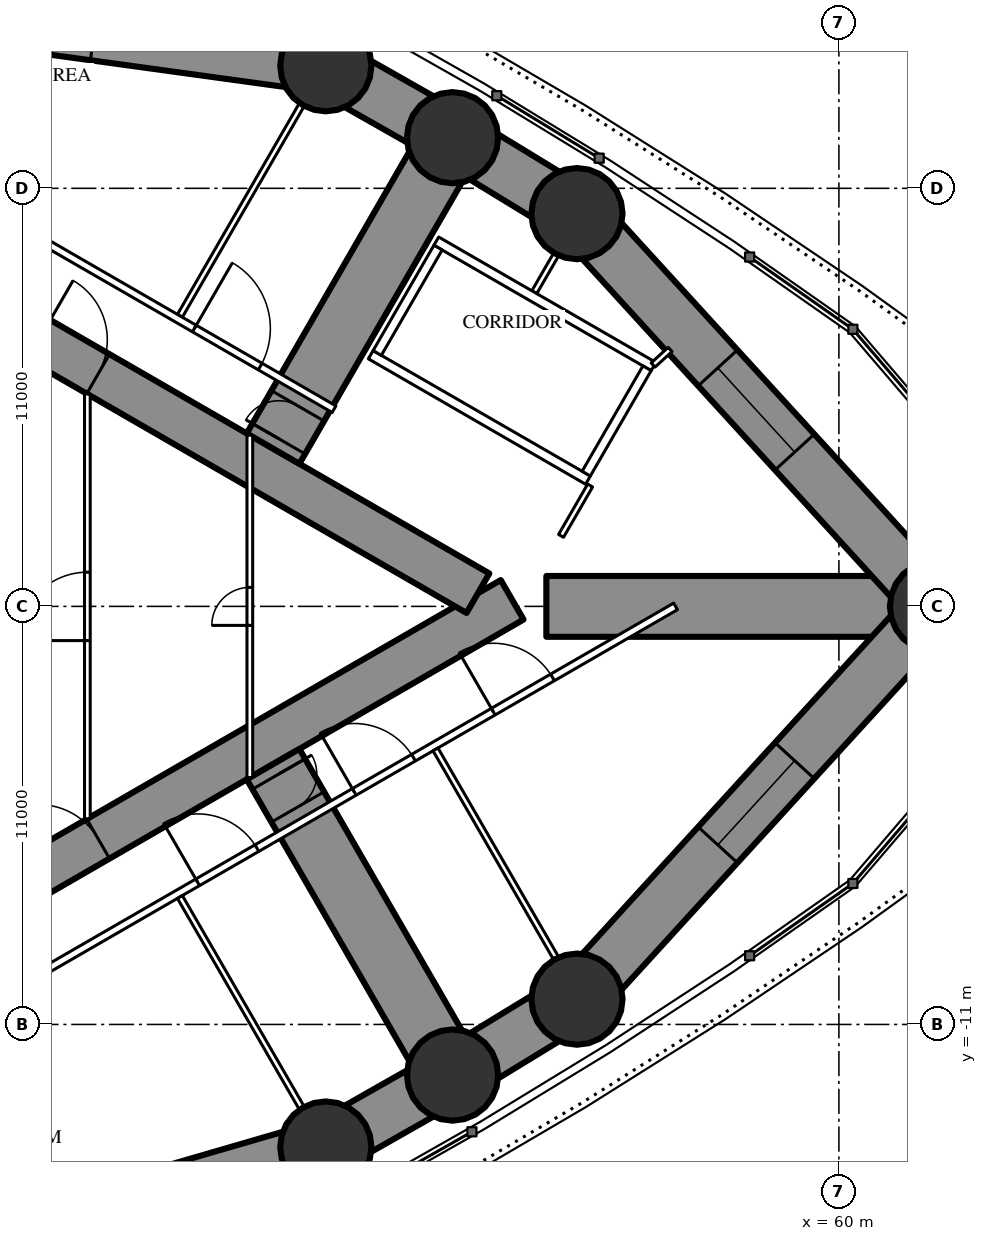
"""IFC4 building model, lengths in metres.
Left out: names, types, materials, properties, quantities, classifications, styles, units other than length and angle.
Written with IfcOpenShell. Run it as: python <this file> out.ifc"""

import sys

from ifc_helpers import new_model, si_unit, direction, frame, frame_2d, origin, origin_2d, place, context, subcontext, project, spatial, rectangle, circle, extrude, element, fill, save


model = new_model("IFC4")
c1 = context("Model", 3, precision=1e-05, world=origin(), true_north=direction((0.0, 1.0)))
c2 = subcontext(c1, "Body", "Model", "MODEL_VIEW")
j1 = project(units=[si_unit("LENGTHUNIT", "METRE"), si_unit("PLANEANGLEUNIT", "RADIAN")], contexts=[c1])
p1 = place(None, origin())
s1 = spatial("IfcSite", under=j1, at=p1, CompositionType="ELEMENT")
p2 = place(p1, origin())
s2 = spatial("IfcBuilding", under=s1, at=p2, CompositionType="ELEMENT")
p3 = place(p2, frame((0.0, 0.0, 210.3)))
s3 = spatial("IfcBuildingStorey", under=s2, at=p3, CompositionType="ELEMENT", Elevation=210.3)
for number, where, z_axis, x_axis in (
    (1, (62.542, 0.0, 0.0), (0.0, 0.0, 1.0), (1.0, 0.0, 0.0)),
    (2, (53.108, 10.334, 0.0), (0.0, 0.0, 1.0), (1.0, 0.0, 0.0)),
    (3, (49.834, 12.332, 0.0), (0.0, 0.0, 1.0), (1.0, 0.0, 0.0)),
    (4, (46.499, 14.226, 0.0), (0.0, 0.0, 1.0), (1.0, 0.0, 0.0)),
    (5, (46.499, -14.226, 0.0), (0.0, 0.0, 1.0), (1.0, 0.0, 0.0)),
    (6, (49.834, -12.332, 0.0), (0.0, 0.0, 1.0), (1.0, 0.0, 0.0)),
    (7, (53.108, -10.334, 0.0), (0.0, 0.0, 1.0), (1.0, 0.0, 0.0)),
):
    element("IfcColumn", number, at=place(p3, frame(where, z_axis=z_axis, x_axis=x_axis)), inside=s3, PredefinedType="COLUMN", context=c2, shape_type="SweptSolid", body=[
        extrude(circle(Radius=1.2, at=origin_2d()), origin(), (0.0, 0.0, 1.0), 5.0),
    ])
p4 = place(p3, frame((27.2, -13.8, 0.0), z_axis=(0.0, 0.0, 1.0), x_axis=(0.866027159892, 0.499996958321, 0.0)))
e8 = element("IfcWall", 8, at=p4, inside=s3, PredefinedType="SHEAR", context=c2, shape_type="SweptSolid", body=[
    extrude(rectangle(XDim=27.947, YDim=1.2, at=frame_2d((13.973, 0.0))), origin(), (0.0, 0.0, 1.0), 5.0),
])
p5 = place(p4, frame((6.5, 0.0, 0.0)))
e9 = element("IfcOpeningElement", 9, at=p5, cuts=e8, PredefinedType="OPENING", context=c2, shape_type="SweptSolid", body=[
    extrude(rectangle(XDim=1.0, YDim=2.2, at=frame_2d((0.5, 1.1))), frame((0.0, 0.61, 0.0), z_axis=(0.0, -1.0, 0.0), x_axis=(1.0, 0.0, 0.0)), (0.0, 0.0, 1.0), 1.22),
])
p6 = place(p4, frame((13.568, 0.0, 0.0)))
e10 = element("IfcOpeningElement", 10, at=p6, cuts=e8, PredefinedType="OPENING", context=c2, shape_type="SweptSolid", body=[
    extrude(rectangle(XDim=1.8, YDim=2.2, at=frame_2d((0.9, 1.1))), frame((0.0, 0.61, 0.0), z_axis=(0.0, -1.0, 0.0), x_axis=(1.0, 0.0, 0.0)), (0.0, 0.0, 1.0), 1.22),
])
p7 = place(p3, frame((27.2, 13.8, 0.0), z_axis=(0.0, 0.0, 1.0), x_axis=(0.866024515034, -0.500001539357, 0.0)))
e11 = element("IfcWall", 11, at=p7, inside=s3, PredefinedType="SHEAR", context=c2, shape_type="SweptSolid", body=[
    extrude(rectangle(XDim=26.907, YDim=1.2, at=frame_2d((13.454, 0.0))), origin(), (0.0, 0.0, 1.0), 5.0),
])
p8 = place(p7, frame((6.5, 0.0, 0.0)))
e12 = element("IfcOpeningElement", 12, at=p8, cuts=e11, PredefinedType="OPENING", context=c2, shape_type="SweptSolid", body=[
    extrude(rectangle(XDim=1.0, YDim=2.2, at=frame_2d((0.5, 1.1))), frame((0.0, 0.61, 0.0), z_axis=(0.0, -1.0, 0.0), x_axis=(1.0, 0.0, 0.0)), (0.0, 0.0, 1.0), 1.22),
])
p9 = place(p7, frame((13.568, 0.0, 0.0)))
e13 = element("IfcOpeningElement", 13, at=p9, cuts=e11, PredefinedType="OPENING", context=c2, shape_type="SweptSolid", body=[
    extrude(rectangle(XDim=1.8, YDim=2.2, at=frame_2d((0.9, 1.1))), frame((0.0, 0.61, 0.0), z_axis=(0.0, -1.0, 0.0), x_axis=(1.0, 0.0, 0.0)), (0.0, 0.0, 1.0), 1.22),
])
p10 = place(p3, frame((45.111, -4.152, 0.0), z_axis=(0.0, 0.0, 1.0), x_axis=(0.499986466662, -0.86603321712, 0.0)))
e14 = element("IfcWall", 14, at=p10, inside=s3, PredefinedType="SHEAR", context=c2, shape_type="SweptSolid", body=[
    extrude(rectangle(XDim=9.446, YDim=1.6, at=frame_2d((4.723, 0.0))), origin(), (0.0, 0.0, 1.0), 5.0),
])
p11 = place(p10, frame((0.3, 0.0, 0.0)))
e15 = element("IfcOpeningElement", 15, at=p11, cuts=e14, PredefinedType="OPENING", context=c2, shape_type="SweptSolid", body=[
    extrude(rectangle(XDim=1.0, YDim=2.2, at=frame_2d((0.5, 1.1))), frame((0.0, 0.81, 0.0), z_axis=(0.0, -1.0, 0.0), x_axis=(1.0, 0.0, 0.0)), (0.0, 0.0, 1.0), 1.62),
])
p12 = place(p3, frame((52.302, 0.0, 0.0), z_axis=(0.0, 0.0, 1.0), x_axis=(1.0, 0.0, 0.0)))
e16 = element("IfcWall", 16, at=p12, inside=s3, PredefinedType="SHEAR", context=c2, shape_type="SweptSolid", body=[
    extrude(rectangle(XDim=10.239, YDim=1.6, at=frame_2d((5.12, 0.0))), origin(), (0.0, 0.0, 1.0), 5.0),
])
p13 = place(p3, frame((45.111, 4.152, 0.0), z_axis=(0.0, 0.0, 1.0), x_axis=(0.499986466662, 0.86603321712, 0.0)))
e17 = element("IfcWall", 17, at=p13, inside=s3, PredefinedType="SHEAR", context=c2, shape_type="SweptSolid", body=[
    extrude(rectangle(XDim=9.446, YDim=1.6, at=frame_2d((4.723, 0.0))), origin(), (0.0, 0.0, 1.0), 5.0),
])
p14 = place(p13, frame((0.3, 0.0, 0.0)))
e18 = element("IfcOpeningElement", 18, at=p14, cuts=e17, PredefinedType="OPENING", context=c2, shape_type="SweptSolid", body=[
    extrude(rectangle(XDim=1.0, YDim=2.2, at=frame_2d((0.5, 1.1))), frame((0.0, 0.81, 0.0), z_axis=(0.0, -1.0, 0.0), x_axis=(1.0, 0.0, 0.0)), (0.0, 0.0, 1.0), 1.62),
])
p15 = place(p3, frame((33.837, -17.906, 0.0), z_axis=(0.0, 0.0, 1.0), x_axis=(0.960258384252, 0.279112585659, 0.0)))
e19 = element("IfcWall", 19, at=p15, inside=s3, PredefinedType="SHEAR", context=c2, shape_type="SweptSolid", body=[
    extrude(rectangle(XDim=13.186, YDim=1.4, at=frame_2d((6.593, 0.0))), origin(), (0.0, 0.0, 1.0), 5.0),
])
p16 = place(p15, frame((5.093, 0.0, 0.6)))
e20 = element("IfcOpeningElement", 20, at=p16, cuts=e19, PredefinedType="OPENING", context=c2, shape_type="SweptSolid", body=[
    extrude(rectangle(XDim=3.0, YDim=1.2, at=frame_2d((1.5, 0.6))), frame((0.0, 0.71, 0.0), z_axis=(0.0, -1.0, 0.0), x_axis=(1.0, 0.0, 0.0)), (0.0, 0.0, 1.0), 1.42),
])
p17 = place(p3, frame((46.499, -14.226, 0.0), z_axis=(0.0, 0.0, 1.0), x_axis=(0.869560321562, 0.493826738001, 0.0)))
e21 = element("IfcWall", 21, at=p17, inside=s3, PredefinedType="SHEAR", context=c2, shape_type="SweptSolid", body=[
    extrude(rectangle(XDim=3.835, YDim=1.4, at=frame_2d((1.917, 0.0))), origin(), (0.0, 0.0, 1.0), 5.0),
])
p18 = place(p3, frame((49.834, -12.332, 0.0), z_axis=(0.0, 0.0, 1.0), x_axis=(0.853604257265, 0.520922040212, 0.0)))
e22 = element("IfcWall", 22, at=p18, inside=s3, PredefinedType="SHEAR", context=c2, shape_type="SweptSolid", body=[
    extrude(rectangle(XDim=3.835, YDim=1.4, at=frame_2d((1.917, 0.0))), origin(), (0.0, 0.0, 1.0), 5.0),
])
p19 = place(p3, frame((53.108, -10.334, 0.0), z_axis=(0.0, 0.0, 1.0), x_axis=(0.674209372947, 0.738540263919, 0.0)))
e23 = element("IfcWall", 23, at=p19, inside=s3, PredefinedType="SHEAR", context=c2, shape_type="SweptSolid", body=[
    extrude(rectangle(XDim=13.992, YDim=1.4, at=frame_2d((6.996, 0.0))), origin(), (0.0, 0.0, 1.0), 5.0),
])
p20 = place(p19, frame((5.496, 0.0, 0.6)))
e24 = element("IfcOpeningElement", 24, at=p20, cuts=e23, PredefinedType="OPENING", context=c2, shape_type="SweptSolid", body=[
    extrude(rectangle(XDim=3.0, YDim=1.2, at=frame_2d((1.5, 0.6))), frame((0.0, 0.71, 0.0), z_axis=(0.0, -1.0, 0.0), x_axis=(1.0, 0.0, 0.0)), (0.0, 0.0, 1.0), 1.42),
])
p21 = place(p3, frame((62.542, 0.0, 0.0), z_axis=(0.0, 0.0, 1.0), x_axis=(-0.674209372947, 0.738540263919, 0.0)))
e25 = element("IfcWall", 25, at=p21, inside=s3, PredefinedType="SHEAR", context=c2, shape_type="SweptSolid", body=[
    extrude(rectangle(XDim=13.992, YDim=1.4, at=frame_2d((6.996, 0.0))), origin(), (0.0, 0.0, 1.0), 5.0),
])
p22 = place(p21, frame((5.496, 0.0, 0.6)))
e26 = element("IfcOpeningElement", 26, at=p22, cuts=e25, PredefinedType="OPENING", context=c2, shape_type="SweptSolid", body=[
    extrude(rectangle(XDim=3.0, YDim=1.2, at=frame_2d((1.5, 0.6))), frame((0.0, 0.71, 0.0), z_axis=(0.0, -1.0, 0.0), x_axis=(1.0, 0.0, 0.0)), (0.0, 0.0, 1.0), 1.42),
])
p23 = place(p3, frame((53.108, 10.334, 0.0), z_axis=(0.0, 0.0, 1.0), x_axis=(-0.853604257265, 0.520922040212, 0.0)))
e27 = element("IfcWall", 27, at=p23, inside=s3, PredefinedType="SHEAR", context=c2, shape_type="SweptSolid", body=[
    extrude(rectangle(XDim=3.835, YDim=1.4, at=frame_2d((1.917, 0.0))), origin(), (0.0, 0.0, 1.0), 5.0),
])
p24 = place(p3, frame((49.834, 12.332, 0.0), z_axis=(0.0, 0.0, 1.0), x_axis=(-0.869560321562, 0.493826738001, 0.0)))
e28 = element("IfcWall", 28, at=p24, inside=s3, PredefinedType="SHEAR", context=c2, shape_type="SweptSolid", body=[
    extrude(rectangle(XDim=3.835, YDim=1.4, at=frame_2d((1.917, 0.0))), origin(), (0.0, 0.0, 1.0), 5.0),
])
p25 = place(p3, frame((46.499, 14.226, 0.0), z_axis=(0.0, 0.0, 1.0), x_axis=(-0.990685830783, 0.13616748762, 0.0)))
e29 = element("IfcWall", 29, at=p25, inside=s3, PredefinedType="SHEAR", context=c2, shape_type="SweptSolid", body=[
    extrude(rectangle(XDim=15.313, YDim=1.4, at=frame_2d((7.657, 0.0))), origin(), (0.0, 0.0, 1.0), 5.0),
])
p26 = place(p25, frame((6.157, 0.0, 0.6)))
e30 = element("IfcOpeningElement", 30, at=p26, cuts=e29, PredefinedType="OPENING", context=c2, shape_type="SweptSolid", body=[
    extrude(rectangle(XDim=3.0, YDim=1.2, at=frame_2d((1.5, 0.6))), frame((0.0, 0.71, 0.0), z_axis=(0.0, -1.0, 0.0), x_axis=(1.0, 0.0, 0.0)), (0.0, 0.0, 1.0), 1.42),
])
p27 = place(p3, frame((28.959, -15.44, 0.0), z_axis=(0.0, 0.0, 1.0), x_axis=(0.866025227435, 0.500000305447, 0.0)))
e31 = element("IfcWall", 31, at=p27, inside=s3, PredefinedType="PARTITIONING", context=c2, shape_type="SweptSolid", body=[
    extrude(rectangle(XDim=30.88, YDim=0.2, at=frame_2d((15.44, 0.0))), origin(), (0.0, 0.0, 1.0), 4.75),
])
p28 = place(p27, frame((6.994, 0.0, 0.0)))
e32 = element("IfcOpeningElement", 32, at=p28, cuts=e31, PredefinedType="OPENING", context=c2, shape_type="SweptSolid", body=[
    extrude(rectangle(XDim=2.0, YDim=2.4, at=frame_2d((1.0, 1.2))), frame((0.0, 0.11, 0.0), z_axis=(0.0, -1.0, 0.0), x_axis=(1.0, 0.0, 0.0)), (0.0, 0.0, 1.0), 0.22),
])
p29 = place(p27, frame((16.36, 0.0, 0.0)))
e33 = element("IfcOpeningElement", 33, at=p29, cuts=e31, PredefinedType="OPENING", context=c2, shape_type="SweptSolid", body=[
    extrude(rectangle(XDim=1.8, YDim=2.2, at=frame_2d((0.9, 1.1))), frame((0.0, 0.11, 0.0), z_axis=(0.0, -1.0, 0.0), x_axis=(1.0, 0.0, 0.0)), (0.0, 0.0, 1.0), 0.22),
])
p30 = place(p27, frame((21.118, 0.0, 0.0)))
e34 = element("IfcOpeningElement", 34, at=p30, cuts=e31, PredefinedType="OPENING", context=c2, shape_type="SweptSolid", body=[
    extrude(rectangle(XDim=1.8, YDim=2.2, at=frame_2d((0.9, 1.1))), frame((0.0, 0.11, 0.0), z_axis=(0.0, -1.0, 0.0), x_axis=(1.0, 0.0, 0.0)), (0.0, 0.0, 1.0), 0.22),
])
p31 = place(p27, frame((25.341, 0.0, 0.0)))
e35 = element("IfcOpeningElement", 35, at=p31, cuts=e31, PredefinedType="OPENING", context=c2, shape_type="SweptSolid", body=[
    extrude(rectangle(XDim=1.8, YDim=2.2, at=frame_2d((0.9, 1.1))), frame((0.0, 0.11, 0.0), z_axis=(0.0, -1.0, 0.0), x_axis=(1.0, 0.0, 0.0)), (0.0, 0.0, 1.0), 0.22),
])
p32 = place(p3, frame((42.66, -7.646, 0.0), z_axis=(0.0, 0.0, 1.0), x_axis=(0.499996592859, -0.866027370889, 0.0)))
e36 = element("IfcWall", 36, at=p32, inside=s3, PredefinedType="PARTITIONING", context=c2, shape_type="SweptSolid", body=[
    extrude(rectangle(XDim=6.398, YDim=0.15, at=frame_2d((3.199, 0.0))), origin(), (0.0, 0.0, 1.0), 3.85),
])
p33 = place(p3, frame((49.385, -3.763, 0.0), z_axis=(0.0, 0.0, 1.0), x_axis=(0.499999447814, -0.866025722589, 0.0)))
e37 = element("IfcWall", 37, at=p33, inside=s3, PredefinedType="PARTITIONING", context=c2, shape_type="SweptSolid", body=[
    extrude(rectangle(XDim=6.333, YDim=0.15, at=frame_2d((3.166, 0.0))), origin(), (0.0, 0.0, 1.0), 3.85),
])
p34 = place(p3, frame((42.66, 7.646, 0.0), z_axis=(0.0, 0.0, 1.0), x_axis=(0.499996592859, 0.866027370889, 0.0)))
e38 = element("IfcWall", 38, at=p34, inside=s3, PredefinedType="PARTITIONING", context=c2, shape_type="SweptSolid", body=[
    extrude(rectangle(XDim=6.398, YDim=0.15, at=frame_2d((3.199, 0.0))), origin(), (0.0, 0.0, 1.0), 3.85),
])
p35 = place(p3, frame((51.985, 8.266, 0.0), z_axis=(0.0, 0.0, 1.0), x_axis=(0.50005843372, 0.865991664432, 0.0)))
e39 = element("IfcWall", 39, at=p35, inside=s3, PredefinedType="PARTITIONING", context=c2, shape_type="SweptSolid", body=[
    extrude(rectangle(XDim=1.132, YDim=0.15, at=frame_2d((0.566, 0.0))), origin(), (0.0, 0.0, 1.0), 4.75),
])
p36 = place(p3, frame((28.959, 15.44, 0.0), z_axis=(0.0, 0.0, 1.0), x_axis=(0.866028936079, -0.499993881836, 0.0)))
e40 = element("IfcWall", 40, at=p36, inside=s3, PredefinedType="PARTITIONING", context=c2, shape_type="SweptSolid", body=[
    extrude(rectangle(XDim=20.503, YDim=0.2, at=frame_2d((10.251, 0.0))), origin(), (0.0, 0.0, 1.0), 4.75),
])
p37 = place(p36, frame((16.26, 0.0, 0.0)))
e41 = element("IfcOpeningElement", 41, at=p37, cuts=e40, PredefinedType="OPENING", context=c2, shape_type="SweptSolid", body=[
    extrude(rectangle(XDim=2.0, YDim=2.4, at=frame_2d((1.0, 1.2))), frame((0.0, 0.11, 0.0), z_axis=(0.0, -1.0, 0.0), x_axis=(1.0, 0.0, 0.0)), (0.0, 0.0, 1.0), 0.22),
])
p38 = place(p36, frame((7.094, 0.0, 0.0)))
e42 = element("IfcOpeningElement", 42, at=p38, cuts=e40, PredefinedType="OPENING", context=c2, shape_type="SweptSolid", body=[
    extrude(rectangle(XDim=1.8, YDim=2.2, at=frame_2d((0.9, 1.1))), frame((0.0, 0.11, 0.0), z_axis=(0.0, -1.0, 0.0), x_axis=(1.0, 0.0, 0.0)), (0.0, 0.0, 1.0), 0.22),
])
p39 = place(p3, frame((52.689, 1.855, 0.0), z_axis=(0.0, 0.0, 1.0), x_axis=(0.500035603698, 0.866004847004, 0.0)))
e43 = element("IfcWall", 43, at=p39, inside=s3, PredefinedType="PARTITIONING", context=c2, shape_type="SweptSolid", body=[
    extrude(rectangle(XDim=1.53, YDim=0.15, at=frame_2d((0.765, 0.0))), origin(), (0.0, 0.0, 1.0), 4.75),
])
p40 = place(p3, frame((40.225, -5.587, 0.0), z_axis=(0.0, 0.0, 1.0), x_axis=(0.0, 1.0, 0.0)))
e44 = element("IfcWall", 44, at=p40, inside=s3, PredefinedType="PARTITIONING", context=c2, shape_type="SweptSolid", body=[
    extrude(rectangle(XDim=11.174, YDim=0.15, at=frame_2d((5.587, 0.0))), origin(), (0.0, 0.0, 1.0), 4.75),
])
p41 = place(p40, frame((4.687, 0.0, 0.0)))
e45 = element("IfcOpeningElement", 45, at=p41, cuts=e44, PredefinedType="OPENING", context=c2, shape_type="SweptSolid", body=[
    extrude(rectangle(XDim=1.8, YDim=2.2, at=frame_2d((0.9, 1.1))), frame((0.0, 0.085, 0.0), z_axis=(0.0, -1.0, 0.0), x_axis=(1.0, 0.0, 0.0)), (0.0, 0.0, 1.0), 0.17),
])
p42 = place(p3, frame((44.5, -4.505, 0.0), z_axis=(0.0, 0.0, 1.0), x_axis=(0.0, 1.0, 0.0)))
e46 = element("IfcWall", 46, at=p42, inside=s3, PredefinedType="PARTITIONING", context=c2, shape_type="SweptSolid", body=[
    extrude(rectangle(XDim=9.009, YDim=0.15, at=frame_2d((4.505, 0.0))), origin(), (0.0, 0.0, 1.0), 4.75),
])
p43 = place(p42, frame((4.005, 0.0, 0.0)))
e47 = element("IfcOpeningElement", 47, at=p43, cuts=e46, PredefinedType="OPENING", context=c2, shape_type="SweptSolid", body=[
    extrude(rectangle(XDim=1.0, YDim=2.2, at=frame_2d((0.5, 1.1))), frame((0.0, 0.085, 0.0), z_axis=(0.0, -1.0, 0.0), x_axis=(1.0, 0.0, 0.0)), (0.0, 0.0, 1.0), 0.17),
])
for number, where, z_axis, x_axis in (
    (48, (47.681, 6.622, 0.0), (0.0, 0.0, 1.0), (0.866, -0.5, 0.0)),
    (49, (49.406, 9.611, 0.0), (0.0, 0.0, 1.0), (0.866, -0.5, 0.0)),
):
    element("IfcWall", number, at=place(p3, frame(where, z_axis=z_axis, x_axis=x_axis)), inside=s3, PredefinedType="PARTITIONING", context=c2, shape_type="SweptSolid", body=[
        extrude(rectangle(XDim=6.6, YDim=0.25, at=frame_2d((3.3, 0.0))), origin(), (0.0, 0.0, 1.0), 4.75),
    ])
p44 = place(p3, frame((47.852, 6.668, 0.0), z_axis=(0.0, 0.0, 1.0), x_axis=(0.499929347863, 0.866066190972, 0.0)))
e50 = element("IfcWall", 50, at=p44, inside=s3, PredefinedType="PARTITIONING", context=c2, shape_type="SweptSolid", body=[
    extrude(rectangle(XDim=3.201, YDim=0.25, at=frame_2d((1.6, 0.0))), origin(), (0.0, 0.0, 1.0), 4.75),
])
p45 = place(p3, frame((53.352, 3.493, 0.0), z_axis=(0.0, 0.0, 1.0), x_axis=(0.499872130319, 0.866099216793, 0.0)))
e51 = element("IfcWall", 51, at=p45, inside=s3, PredefinedType="PARTITIONING", context=c2, shape_type="SweptSolid", body=[
    extrude(rectangle(XDim=3.2, YDim=0.25, at=frame_2d((1.6, 0.0))), origin(), (0.0, 0.0, 1.0), 4.75),
])
p46 = place(p3, frame((55.111, 6.352, 0.0), z_axis=(0.0, 0.0, 1.0), x_axis=(0.738625136196, 0.674116390677, 0.0)))
e52 = element("IfcWall", 52, at=p46, inside=s3, PredefinedType="PARTITIONING", context=c2, shape_type="SweptSolid", body=[
    extrude(rectangle(XDim=0.605, YDim=0.15, at=frame_2d((0.303, 0.0))), origin(), (0.0, 0.0, 1.0), 4.75),
])
p47 = place(p20, origin())
e53 = element("IfcWindow", 53, at=p47, inside=s3, PartitioningType="SINGLE_PANEL", PredefinedType="WINDOW", context=c2, shape_type="SweptSolid", body=[
    extrude(rectangle(XDim=3.0, YDim=1.2, at=frame_2d((1.5, 0.6))), frame((0.0, 0.03, 0.0), z_axis=(0.0, -1.0, 0.0), x_axis=(1.0, 0.0, 0.0)), (0.0, 0.0, 1.0), 0.06),
])
fill(e24, e53)
p48 = place(p22, origin())
e54 = element("IfcWindow", 54, at=p48, inside=s3, PartitioningType="SINGLE_PANEL", PredefinedType="WINDOW", context=c2, shape_type="SweptSolid", body=[
    extrude(rectangle(XDim=3.0, YDim=1.2, at=frame_2d((1.5, 0.6))), frame((0.0, 0.03, 0.0), z_axis=(0.0, -1.0, 0.0), x_axis=(1.0, 0.0, 0.0)), (0.0, 0.0, 1.0), 0.06),
])
fill(e26, e54)
p49 = place(p11, origin())
e55 = element("IfcDoor", 55, at=p49, inside=s3, OperationType="SINGLE_SWING_LEFT", PredefinedType="DOOR", context=c2, shape_type="SweptSolid", body=[
    extrude(rectangle(XDim=1.0, YDim=2.2, at=frame_2d((0.5, 1.1))), frame((0.0, 0.025, 0.0), z_axis=(0.0, -1.0, 0.0), x_axis=(1.0, 0.0, 0.0)), (0.0, 0.0, 1.0), 0.05),
])
fill(e15, e55)
p50 = place(p14, origin())
e56 = element("IfcDoor", 56, at=p50, inside=s3, OperationType="SINGLE_SWING_LEFT", PredefinedType="DOOR", context=c2, shape_type="SweptSolid", body=[
    extrude(rectangle(XDim=1.0, YDim=2.2, at=frame_2d((0.5, 1.1))), frame((0.0, 0.025, 0.0), z_axis=(0.0, -1.0, 0.0), x_axis=(1.0, 0.0, 0.0)), (0.0, 0.0, 1.0), 0.05),
])
fill(e18, e56)
p51 = place(p29, origin())
e57 = element("IfcDoor", 57, at=p51, inside=s3, OperationType="DOUBLE_DOOR_SINGLE_SWING", PredefinedType="DOOR", context=c2, shape_type="SweptSolid", body=[
    extrude(rectangle(XDim=1.8, YDim=2.2, at=frame_2d((0.9, 1.1))), frame((0.0, 0.025, 0.0), z_axis=(0.0, -1.0, 0.0), x_axis=(1.0, 0.0, 0.0)), (0.0, 0.0, 1.0), 0.05),
])
fill(e33, e57)
p52 = place(p30, origin())
e58 = element("IfcDoor", 58, at=p52, inside=s3, OperationType="DOUBLE_DOOR_SINGLE_SWING", PredefinedType="DOOR", context=c2, shape_type="SweptSolid", body=[
    extrude(rectangle(XDim=1.8, YDim=2.2, at=frame_2d((0.9, 1.1))), frame((0.0, 0.025, 0.0), z_axis=(0.0, -1.0, 0.0), x_axis=(1.0, 0.0, 0.0)), (0.0, 0.0, 1.0), 0.05),
])
fill(e34, e58)
p53 = place(p31, origin())
e59 = element("IfcDoor", 59, at=p53, inside=s3, OperationType="DOUBLE_DOOR_SINGLE_SWING", PredefinedType="DOOR", context=c2, shape_type="SweptSolid", body=[
    extrude(rectangle(XDim=1.8, YDim=2.2, at=frame_2d((0.9, 1.1))), frame((0.0, 0.025, 0.0), z_axis=(0.0, -1.0, 0.0), x_axis=(1.0, 0.0, 0.0)), (0.0, 0.0, 1.0), 0.05),
])
fill(e35, e59)
p54 = place(p37, origin())
e60 = element("IfcDoor", 60, at=p54, inside=s3, OperationType="DOUBLE_DOOR_SINGLE_SWING", PredefinedType="DOOR", context=c2, shape_type="SweptSolid", body=[
    extrude(rectangle(XDim=2.0, YDim=2.4, at=frame_2d((1.0, 1.2))), frame((0.0, 0.025, 0.0), z_axis=(0.0, -1.0, 0.0), x_axis=(1.0, 0.0, 0.0)), (0.0, 0.0, 1.0), 0.05),
])
fill(e41, e60)
p55 = place(p41, origin())
e61 = element("IfcDoor", 61, at=p55, inside=s3, OperationType="DOUBLE_DOOR_SINGLE_SWING", PredefinedType="DOOR", context=c2, shape_type="SweptSolid", body=[
    extrude(rectangle(XDim=1.8, YDim=2.2, at=frame_2d((0.9, 1.1))), frame((0.0, 0.025, 0.0), z_axis=(0.0, -1.0, 0.0), x_axis=(1.0, 0.0, 0.0)), (0.0, 0.0, 1.0), 0.05),
])
fill(e45, e61)
p56 = place(p43, origin())
e62 = element("IfcDoor", 62, at=p56, inside=s3, OperationType="SINGLE_SWING_LEFT", PredefinedType="DOOR", context=c2, shape_type="SweptSolid", body=[
    extrude(rectangle(XDim=1.0, YDim=2.2, at=frame_2d((0.5, 1.1))), frame((0.0, 0.025, 0.0), z_axis=(0.0, -1.0, 0.0), x_axis=(1.0, 0.0, 0.0)), (0.0, 0.0, 1.0), 0.05),
])
fill(e47, e62)
p57 = place(p6, origin())
e63 = element("IfcDoor", 63, at=p57, inside=s3, OperationType="DOUBLE_DOOR_SINGLE_SWING", PredefinedType="DOOR", context=c2, shape_type="SweptSolid", body=[
    extrude(rectangle(XDim=1.8, YDim=2.2, at=frame_2d((0.9, 1.1))), frame((0.0, 0.025, 0.0), z_axis=(0.0, -1.0, 0.0), x_axis=(1.0, 0.0, 0.0)), (0.0, 0.0, 1.0), 0.05),
])
fill(e10, e63)
p58 = place(p9, origin())
e64 = element("IfcDoor", 64, at=p58, inside=s3, OperationType="DOUBLE_DOOR_SINGLE_SWING", PredefinedType="DOOR", context=c2, shape_type="SweptSolid", body=[
    extrude(rectangle(XDim=1.8, YDim=2.2, at=frame_2d((0.9, 1.1))), frame((0.0, 0.025, 0.0), z_axis=(0.0, -1.0, 0.0), x_axis=(1.0, 0.0, 0.0)), (0.0, 0.0, 1.0), 0.05),
])
fill(e13, e64)
save(model, sys.argv[1])
